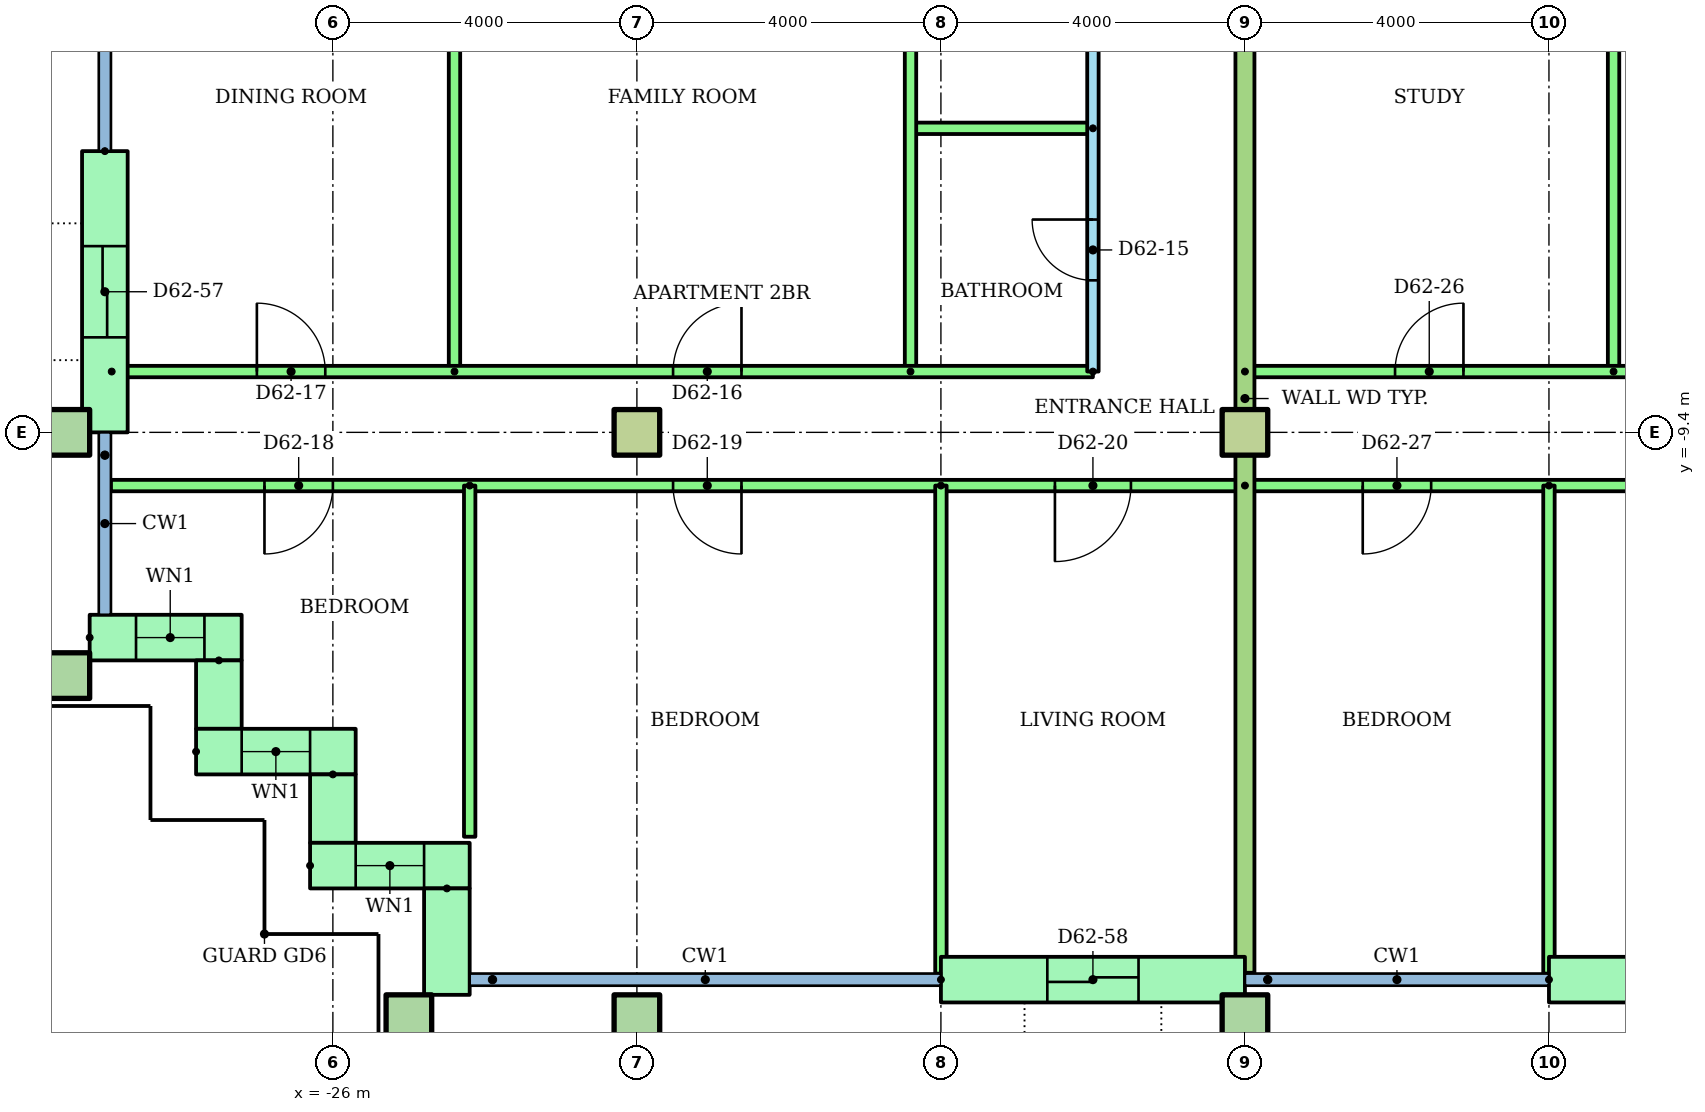
"""IFC4 building model, lengths in metres.
Left out: names, types, materials, properties, quantities, classifications, styles, units other than length and angle.
Written with IfcOpenShell. Run it as: python <this file> out.ifc"""

import sys

from ifc_helpers import new_model, si_unit, direction, frame, frame_2d, origin, origin_2d, place, context, subcontext, project, spatial, rectangle, hollow_rectangle, extrude, element, fill, save


model = new_model("IFC4")
c1 = context("Model", 3, precision=1e-05, world=origin(), true_north=direction((0.0, 1.0)))
c2 = subcontext(c1, "Body", "Model", "MODEL_VIEW")
j1 = project(units=[si_unit("LENGTHUNIT", "METRE"), si_unit("PLANEANGLEUNIT", "RADIAN")], contexts=[c1])
p1 = place(None, origin())
s1 = spatial("IfcSite", under=j1, at=p1, CompositionType="ELEMENT")
p2 = place(p1, origin())
s2 = spatial("IfcBuilding", under=s1, at=p2, CompositionType="ELEMENT")
p3 = place(p2, frame((0.0, 0.0, 236.4)))
s3 = spatial("IfcBuildingStorey", under=s2, at=p3, CompositionType="ELEMENT", Elevation=236.4)
for number, where in (
    (1, (-25.0, -17.1, 0.0)),
    (2, (-22.0, -17.1, 0.0)),
    (3, (-14.0, -17.1, 0.0)),
    (4, (-29.5, -12.6, 0.0)),
    (5, (-29.5, -9.4, 0.0)),
):
    element("IfcColumn", number, at=place(p3, frame(where)), inside=s3, PredefinedType="COLUMN", context=c2, shape_type="SweptSolid", body=[
        extrude(hollow_rectangle(XDim=0.6, YDim=0.6, WallThickness=0.03, at=origin_2d()), origin(), (0.0, 0.0, 1.0), 3.2),
    ])
for number, where in (
    (6, (-22.0, -9.4, 0.0)),
    (7, (-14.0, -9.4, 0.0)),
):
    element("IfcColumn", number, at=place(p3, frame(where)), inside=s3, PredefinedType="COLUMN", context=c2, shape_type="SweptSolid", body=[
        extrude(rectangle(XDim=0.6, YDim=0.6, at=origin_2d()), origin(), (0.0, 0.0, 1.0), 3.2),
    ])
p4 = place(p3, frame((-29.0, -5.7, 0.0), z_axis=(0.0, 0.0, 1.0), x_axis=(0.0, -1.0, 0.0)))
e8 = element("IfcWall", 8, at=p4, inside=s3, PredefinedType="STANDARD", context=c2, shape_type="SweptSolid", body=[
    extrude(rectangle(XDim=3.7, YDim=0.6, at=frame_2d((1.85, 0.0))), origin(), (0.0, 0.0, 1.0), 2.8),
])
p5 = place(p4, frame((1.25, 0.0, 0.0)))
e9 = element("IfcOpeningElement", 9, at=p5, cuts=e8, PredefinedType="OPENING", context=c2, shape_type="SweptSolid", body=[
    extrude(rectangle(XDim=1.2, YDim=2.1, at=frame_2d((0.6, 1.05))), frame((0.0, 0.31, 0.0), z_axis=(0.0, -1.0, 0.0), x_axis=(1.0, 0.0, 0.0)), (0.0, 0.0, 1.0), 0.62),
])
p6 = place(p3, frame((-29.2, -12.1, 0.0)))
e10 = element("IfcWall", 10, at=p6, inside=s3, PredefinedType="STANDARD", context=c2, shape_type="SweptSolid", body=[
    extrude(rectangle(XDim=2.0, YDim=0.6, at=frame_2d((1.0, 0.0))), origin(), (0.0, 0.0, 1.0), 2.8),
])
p7 = place(p6, frame((0.61, 0.0, 0.9)))
e11 = element("IfcOpeningElement", 11, at=p7, cuts=e10, PredefinedType="OPENING", context=c2, shape_type="SweptSolid", body=[
    extrude(rectangle(XDim=0.9, YDim=1.5, at=frame_2d((0.45, 0.75))), frame((0.0, 0.31, 0.0), z_axis=(0.0, -1.0, 0.0), x_axis=(1.0, 0.0, 0.0)), (0.0, 0.0, 1.0), 0.62),
])
p8 = place(p3, frame((-27.5, -12.4, 0.0), z_axis=(0.0, 0.0, 1.0), x_axis=(0.0, -1.0, 0.0)))
e12 = element("IfcWall", 12, at=p8, inside=s3, PredefinedType="STANDARD", context=c2, shape_type="SweptSolid", body=[
    extrude(rectangle(XDim=0.9, YDim=0.6, at=frame_2d((0.45, 0.0))), origin(), (0.0, 0.0, 1.0), 2.8),
])
p9 = place(p3, frame((-27.8, -13.6, 0.0)))
e13 = element("IfcWall", 13, at=p9, inside=s3, PredefinedType="STANDARD", context=c2, shape_type="SweptSolid", body=[
    extrude(rectangle(XDim=2.1, YDim=0.6, at=frame_2d((1.05, 0.0))), origin(), (0.0, 0.0, 1.0), 2.8),
])
p10 = place(p9, frame((0.6, 0.0, 0.9)))
e14 = element("IfcOpeningElement", 14, at=p10, cuts=e13, PredefinedType="OPENING", context=c2, shape_type="SweptSolid", body=[
    extrude(rectangle(XDim=0.9, YDim=1.5, at=frame_2d((0.45, 0.75))), frame((0.0, 0.31, 0.0), z_axis=(0.0, -1.0, 0.0), x_axis=(1.0, 0.0, 0.0)), (0.0, 0.0, 1.0), 0.62),
])
p11 = place(p3, frame((-26.0, -13.9, 0.0), z_axis=(0.0, 0.0, 1.0), x_axis=(0.0, -1.0, 0.0)))
e15 = element("IfcWall", 15, at=p11, inside=s3, PredefinedType="STANDARD", context=c2, shape_type="SweptSolid", body=[
    extrude(rectangle(XDim=0.9, YDim=0.6, at=frame_2d((0.45, 0.0))), origin(), (0.0, 0.0, 1.0), 2.8),
])
p12 = place(p3, frame((-26.3, -15.1, 0.0)))
e16 = element("IfcWall", 16, at=p12, inside=s3, PredefinedType="STANDARD", context=c2, shape_type="SweptSolid", body=[
    extrude(rectangle(XDim=2.1, YDim=0.6, at=frame_2d((1.05, 0.0))), origin(), (0.0, 0.0, 1.0), 2.8),
])
p13 = place(p12, frame((0.6, 0.0, 0.9)))
e17 = element("IfcOpeningElement", 17, at=p13, cuts=e16, PredefinedType="OPENING", context=c2, shape_type="SweptSolid", body=[
    extrude(rectangle(XDim=0.9, YDim=1.5, at=frame_2d((0.45, 0.75))), frame((0.0, 0.31, 0.0), z_axis=(0.0, -1.0, 0.0), x_axis=(1.0, 0.0, 0.0)), (0.0, 0.0, 1.0), 0.62),
])
p14 = place(p3, frame((-24.5, -15.4, 0.0), z_axis=(0.0, 0.0, 1.0), x_axis=(0.0, -1.0, 0.0)))
e18 = element("IfcWall", 18, at=p14, inside=s3, PredefinedType="STANDARD", context=c2, shape_type="SweptSolid", body=[
    extrude(rectangle(XDim=1.4, YDim=0.6, at=frame_2d((0.7, 0.0))), origin(), (0.0, 0.0, 1.0), 2.8),
])
p15 = place(p3, frame((-18.0, -16.6, 0.0)))
e19 = element("IfcWall", 19, at=p15, inside=s3, PredefinedType="STANDARD", context=c2, shape_type="SweptSolid", body=[
    extrude(rectangle(XDim=4.0, YDim=0.6, at=frame_2d((2.0, 0.0))), origin(), (0.0, 0.0, 1.0), 2.8),
])
p16 = place(p15, frame((1.4, 0.0, 0.0)))
e20 = element("IfcOpeningElement", 20, at=p16, cuts=e19, PredefinedType="OPENING", context=c2, shape_type="SweptSolid", body=[
    extrude(rectangle(XDim=1.2, YDim=2.1, at=frame_2d((0.6, 1.05))), frame((0.0, 0.31, 0.0), z_axis=(0.0, -1.0, 0.0), x_axis=(1.0, 0.0, 0.0)), (0.0, 0.0, 1.0), 0.62),
])
p17 = place(p3, frame((-10.0, -16.6, 0.0)))
e21 = element("IfcWall", 21, at=p17, inside=s3, PredefinedType="STANDARD", context=c2, shape_type="SweptSolid", body=[
    extrude(rectangle(XDim=4.0, YDim=0.6, at=frame_2d((2.0, 0.0))), origin(), (0.0, 0.0, 1.0), 2.8),
])
p18 = place(p17, frame((1.4, 0.0, 0.0)))
e22 = element("IfcOpeningElement", 22, at=p18, cuts=e21, PredefinedType="OPENING", context=c2, shape_type="SweptSolid", body=[
    extrude(rectangle(XDim=1.2, YDim=2.1, at=frame_2d((0.6, 1.05))), frame((0.0, 0.31, 0.0), z_axis=(0.0, -1.0, 0.0), x_axis=(1.0, 0.0, 0.0)), (0.0, 0.0, 1.0), 0.62),
])
p19 = place(p3, frame((-16.0, -8.6, 0.0), z_axis=(0.0, 0.0, 1.0), x_axis=(0.0, 1.0, 0.0)))
e23 = element("IfcWall", 23, at=p19, inside=s3, PredefinedType="PARTITIONING", context=c2, shape_type="SweptSolid", body=[
    extrude(rectangle(XDim=7.2, YDim=0.15, at=frame_2d((3.6, 0.0))), origin(), (0.0, 0.0, 1.0), 2.4),
])
p20 = place(p19, frame((4.75, 0.0, 0.0)))
e24 = element("IfcOpeningElement", 24, at=p20, cuts=e23, PredefinedType="OPENING", context=c2, shape_type="SweptSolid", body=[
    extrude(rectangle(XDim=0.9, YDim=2.1, at=frame_2d((0.45, 1.05))), frame((0.0, 0.085, 0.0), z_axis=(0.0, -1.0, 0.0), x_axis=(1.0, 0.0, 0.0)), (0.0, 0.0, 1.0), 0.17),
])
p21 = place(p19, frame((1.2, 0.0, 0.0)))
e25 = element("IfcOpeningElement", 25, at=p21, cuts=e23, PredefinedType="OPENING", context=c2, shape_type="SweptSolid", body=[
    extrude(rectangle(XDim=0.8, YDim=2.1, at=frame_2d((0.4, 1.05))), frame((0.0, 0.085, 0.0), z_axis=(0.0, -1.0, 0.0), x_axis=(1.0, 0.0, 0.0)), (0.0, 0.0, 1.0), 0.17),
])
p22 = place(p3, frame((-16.0, -5.4, 0.0), z_axis=(0.0, 0.0, 1.0), x_axis=(-1.0, 0.0, 0.0)))
e26 = element("IfcWall", 26, at=p22, inside=s3, PredefinedType="PARTITIONING", context=c2, shape_type="SweptSolid", body=[
    extrude(rectangle(XDim=2.4, YDim=0.15, at=frame_2d((1.2, 0.0))), origin(), (0.0, 0.0, 1.0), 2.4),
])
for number, where, z_axis, x_axis in (
    (27, (-18.4, -8.6, 0.0), (0.0, 0.0, 1.0), (0.0, 1.0, 0.0)),
    (28, (-24.4, -8.6, 0.0), (0.0, 0.0, 1.0), (0.0, 1.0, 0.0)),
):
    element("IfcWall", number, at=place(p3, frame(where, z_axis=z_axis, x_axis=x_axis)), inside=s3, PredefinedType="PARTITIONING", context=c2, shape_type="SweptSolid", body=[
        extrude(rectangle(XDim=7.2, YDim=0.15, at=frame_2d((3.6, 0.0))), origin(), (0.0, 0.0, 1.0), 2.4),
    ])
p23 = place(p3, frame((-28.91, -8.6, 0.0)))
e29 = element("IfcWall", 29, at=p23, inside=s3, PredefinedType="PARTITIONING", context=c2, shape_type="SweptSolid", body=[
    extrude(rectangle(XDim=12.91, YDim=0.15, at=frame_2d((6.455, 0.0))), origin(), (0.0, 0.0, 1.0), 2.4),
])
p24 = place(p23, frame((7.386, 0.0, 0.0)))
e30 = element("IfcOpeningElement", 30, at=p24, cuts=e29, PredefinedType="OPENING", context=c2, shape_type="SweptSolid", body=[
    extrude(rectangle(XDim=0.9, YDim=2.1, at=frame_2d((0.45, 1.05))), frame((0.0, 0.085, 0.0), z_axis=(0.0, -1.0, 0.0), x_axis=(1.0, 0.0, 0.0)), (0.0, 0.0, 1.0), 0.17),
])
p25 = place(p23, frame((1.91, 0.0, 0.0)))
e31 = element("IfcOpeningElement", 31, at=p25, cuts=e29, PredefinedType="OPENING", context=c2, shape_type="SweptSolid", body=[
    extrude(rectangle(XDim=0.9, YDim=2.1, at=frame_2d((0.45, 1.05))), frame((0.0, 0.085, 0.0), z_axis=(0.0, -1.0, 0.0), x_axis=(1.0, 0.0, 0.0)), (0.0, 0.0, 1.0), 0.17),
])
p26 = place(p3, frame((-14.0, -10.1, 0.0), z_axis=(0.0, 0.0, 1.0), x_axis=(-1.0, 0.0, 0.0)))
e32 = element("IfcWall", 32, at=p26, inside=s3, PredefinedType="PARTITIONING", context=c2, shape_type="SweptSolid", body=[
    extrude(rectangle(XDim=14.92, YDim=0.15, at=frame_2d((7.46, 0.0))), origin(), (0.0, 0.0, 1.0), 2.4),
])
p27 = place(p26, frame((12.0, 0.0, 0.0)))
e33 = element("IfcOpeningElement", 33, at=p27, cuts=e32, PredefinedType="OPENING", context=c2, shape_type="SweptSolid", body=[
    extrude(rectangle(XDim=0.9, YDim=2.1, at=frame_2d((0.45, 1.05))), frame((0.0, 0.085, 0.0), z_axis=(0.0, -1.0, 0.0), x_axis=(1.0, 0.0, 0.0)), (0.0, 0.0, 1.0), 0.17),
])
p28 = place(p26, frame((6.624, 0.0, 0.0)))
e34 = element("IfcOpeningElement", 34, at=p28, cuts=e32, PredefinedType="OPENING", context=c2, shape_type="SweptSolid", body=[
    extrude(rectangle(XDim=0.9, YDim=2.1, at=frame_2d((0.45, 1.05))), frame((0.0, 0.085, 0.0), z_axis=(0.0, -1.0, 0.0), x_axis=(1.0, 0.0, 0.0)), (0.0, 0.0, 1.0), 0.17),
])
p29 = place(p26, frame((1.5, 0.0, 0.0)))
e35 = element("IfcOpeningElement", 35, at=p29, cuts=e32, PredefinedType="OPENING", context=c2, shape_type="SweptSolid", body=[
    extrude(rectangle(XDim=1.0, YDim=2.1, at=frame_2d((0.5, 1.05))), frame((0.0, 0.085, 0.0), z_axis=(0.0, -1.0, 0.0), x_axis=(1.0, 0.0, 0.0)), (0.0, 0.0, 1.0), 0.17),
])
p30 = place(p3, frame((-24.2, -10.1, 0.0), z_axis=(0.0, 0.0, 1.0), x_axis=(0.0, -1.0, 0.0)))
e36 = element("IfcWall", 36, at=p30, inside=s3, PredefinedType="PARTITIONING", context=c2, shape_type="SweptSolid", body=[
    extrude(rectangle(XDim=4.62, YDim=0.15, at=frame_2d((2.31, 0.0))), origin(), (0.0, 0.0, 1.0), 2.4),
])
p31 = place(p3, frame((-18.0, -10.1, 0.0), z_axis=(0.0, 0.0, 1.0), x_axis=(0.0, -1.0, 0.0)))
e37 = element("IfcWall", 37, at=p31, inside=s3, PredefinedType="PARTITIONING", context=c2, shape_type="SweptSolid", body=[
    extrude(rectangle(XDim=6.421, YDim=0.15, at=frame_2d((3.21, 0.0))), origin(), (0.0, 0.0, 1.0), 2.4),
])
p32 = place(p3, frame((-9.15, -8.6, 0.0), z_axis=(0.0, 0.0, 1.0), x_axis=(0.0, 1.0, 0.0)))
e38 = element("IfcWall", 38, at=p32, inside=s3, PredefinedType="PARTITIONING", context=c2, shape_type="SweptSolid", body=[
    extrude(rectangle(XDim=7.2, YDim=0.15, at=frame_2d((3.6, 0.0))), origin(), (0.0, 0.0, 1.0), 2.4),
])
p33 = place(p3, frame((-14.0, -8.6, 0.0)))
e39 = element("IfcWall", 39, at=p33, inside=s3, PredefinedType="PARTITIONING", context=c2, shape_type="SweptSolid", body=[
    extrude(rectangle(XDim=14.0, YDim=0.15, at=frame_2d((7.0, 0.0))), origin(), (0.0, 0.0, 1.0), 2.4),
])
p34 = place(p33, frame((9.65, 0.0, 0.0)))
e40 = element("IfcOpeningElement", 40, at=p34, cuts=e39, PredefinedType="OPENING", context=c2, shape_type="SweptSolid", body=[
    extrude(rectangle(XDim=0.9, YDim=2.1, at=frame_2d((0.45, 1.05))), frame((0.0, 0.085, 0.0), z_axis=(0.0, -1.0, 0.0), x_axis=(1.0, 0.0, 0.0)), (0.0, 0.0, 1.0), 0.17),
])
p35 = place(p33, frame((6.275, 0.0, 0.0)))
e41 = element("IfcOpeningElement", 41, at=p35, cuts=e39, PredefinedType="OPENING", context=c2, shape_type="SweptSolid", body=[
    extrude(rectangle(XDim=0.9, YDim=2.1, at=frame_2d((0.45, 1.05))), frame((0.0, 0.085, 0.0), z_axis=(0.0, -1.0, 0.0), x_axis=(1.0, 0.0, 0.0)), (0.0, 0.0, 1.0), 0.17),
])
p36 = place(p33, frame((1.975, 0.0, 0.0)))
e42 = element("IfcOpeningElement", 42, at=p36, cuts=e39, PredefinedType="OPENING", context=c2, shape_type="SweptSolid", body=[
    extrude(rectangle(XDim=0.9, YDim=2.1, at=frame_2d((0.45, 1.05))), frame((0.0, 0.085, 0.0), z_axis=(0.0, -1.0, 0.0), x_axis=(1.0, 0.0, 0.0)), (0.0, 0.0, 1.0), 0.17),
])
p37 = place(p3, frame((2.0, -10.1, 0.0), z_axis=(0.0, 0.0, 1.0), x_axis=(-1.0, 0.0, 0.0)))
e43 = element("IfcWall", 43, at=p37, inside=s3, PredefinedType="PARTITIONING", context=c2, shape_type="SweptSolid", body=[
    extrude(rectangle(XDim=16.0, YDim=0.15, at=frame_2d((8.0, 0.0))), origin(), (0.0, 0.0, 1.0), 2.4),
])
p38 = place(p37, frame((13.55, 0.0, 0.0)))
e44 = element("IfcOpeningElement", 44, at=p38, cuts=e43, PredefinedType="OPENING", context=c2, shape_type="SweptSolid", body=[
    extrude(rectangle(XDim=0.9, YDim=2.1, at=frame_2d((0.45, 1.05))), frame((0.0, 0.085, 0.0), z_axis=(0.0, -1.0, 0.0), x_axis=(1.0, 0.0, 0.0)), (0.0, 0.0, 1.0), 0.17),
])
p39 = place(p37, frame((9.55, 0.0, 0.0)))
e45 = element("IfcOpeningElement", 45, at=p39, cuts=e43, PredefinedType="OPENING", context=c2, shape_type="SweptSolid", body=[
    extrude(rectangle(XDim=0.9, YDim=2.1, at=frame_2d((0.45, 1.05))), frame((0.0, 0.085, 0.0), z_axis=(0.0, -1.0, 0.0), x_axis=(1.0, 0.0, 0.0)), (0.0, 0.0, 1.0), 0.17),
])
p40 = place(p37, frame((3.5, 0.0, 0.0)))
e46 = element("IfcOpeningElement", 46, at=p40, cuts=e43, PredefinedType="OPENING", context=c2, shape_type="SweptSolid", body=[
    extrude(rectangle(XDim=1.0, YDim=2.1, at=frame_2d((0.5, 1.05))), frame((0.0, 0.085, 0.0), z_axis=(0.0, -1.0, 0.0), x_axis=(1.0, 0.0, 0.0)), (0.0, 0.0, 1.0), 0.17),
])
p41 = place(p3, frame((-10.0, -10.1, 0.0), z_axis=(0.0, 0.0, 1.0), x_axis=(0.0, -1.0, 0.0)))
e47 = element("IfcWall", 47, at=p41, inside=s3, PredefinedType="PARTITIONING", context=c2, shape_type="SweptSolid", body=[
    extrude(rectangle(XDim=6.421, YDim=0.15, at=frame_2d((3.21, 0.0))), origin(), (0.0, 0.0, 1.0), 2.4),
])
p42 = place(p3, frame((-14.0, -1.4, 0.0), z_axis=(0.0, 0.0, 1.0), x_axis=(0.0, -1.0, 0.0)))
e48 = element("IfcWall", 48, at=p42, inside=s3, PredefinedType="PARTITIONING", context=c2, shape_type="SweptSolid", body=[
    extrude(rectangle(XDim=15.11, YDim=0.25, at=frame_2d((7.555, 0.0))), origin(), (0.0, 0.0, 1.0), 2.4),
])
p43 = place(p7, origin())
e49 = element("IfcWindow", 49, at=p43, inside=s3, PartitioningType="SINGLE_PANEL", PredefinedType="WINDOW", context=c2, shape_type="SweptSolid", body=[
    extrude(rectangle(XDim=0.9, YDim=1.5, at=frame_2d((0.45, 0.75))), frame((0.0, 0.03, 0.0), z_axis=(0.0, -1.0, 0.0), x_axis=(1.0, 0.0, 0.0)), (0.0, 0.0, 1.0), 0.06),
])
fill(e11, e49)
p44 = place(p10, origin())
e50 = element("IfcWindow", 50, at=p44, inside=s3, PartitioningType="SINGLE_PANEL", PredefinedType="WINDOW", context=c2, shape_type="SweptSolid", body=[
    extrude(rectangle(XDim=0.9, YDim=1.5, at=frame_2d((0.45, 0.75))), frame((0.0, 0.03, 0.0), z_axis=(0.0, -1.0, 0.0), x_axis=(1.0, 0.0, 0.0)), (0.0, 0.0, 1.0), 0.06),
])
fill(e14, e50)
p45 = place(p13, origin())
e51 = element("IfcWindow", 51, at=p45, inside=s3, PartitioningType="SINGLE_PANEL", PredefinedType="WINDOW", context=c2, shape_type="SweptSolid", body=[
    extrude(rectangle(XDim=0.9, YDim=1.5, at=frame_2d((0.45, 0.75))), frame((0.0, 0.03, 0.0), z_axis=(0.0, -1.0, 0.0), x_axis=(1.0, 0.0, 0.0)), (0.0, 0.0, 1.0), 0.06),
])
fill(e17, e51)
p46 = place(p21, origin())
e52 = element("IfcDoor", 52, at=p46, inside=s3, OperationType="SINGLE_SWING_RIGHT", PredefinedType="DOOR", context=c2, shape_type="SweptSolid", body=[
    extrude(rectangle(XDim=0.8, YDim=2.1, at=frame_2d((0.4, 1.05))), frame((0.0, 0.025, 0.0), z_axis=(0.0, -1.0, 0.0), x_axis=(1.0, 0.0, 0.0)), (0.0, 0.0, 1.0), 0.05),
])
fill(e25, e52)
p47 = place(p24, origin())
e53 = element("IfcDoor", 53, at=p47, inside=s3, OperationType="SINGLE_SWING_RIGHT", PredefinedType="DOOR", context=c2, shape_type="SweptSolid", body=[
    extrude(rectangle(XDim=0.9, YDim=2.1, at=frame_2d((0.45, 1.05))), frame((0.0, 0.025, 0.0), z_axis=(0.0, -1.0, 0.0), x_axis=(1.0, 0.0, 0.0)), (0.0, 0.0, 1.0), 0.05),
])
fill(e30, e53)
p48 = place(p25, origin())
e54 = element("IfcDoor", 54, at=p48, inside=s3, OperationType="SINGLE_SWING_LEFT", PredefinedType="DOOR", context=c2, shape_type="SweptSolid", body=[
    extrude(rectangle(XDim=0.9, YDim=2.1, at=frame_2d((0.45, 1.05))), frame((0.0, 0.025, 0.0), z_axis=(0.0, -1.0, 0.0), x_axis=(1.0, 0.0, 0.0)), (0.0, 0.0, 1.0), 0.05),
])
fill(e31, e54)
p49 = place(p27, origin())
e55 = element("IfcDoor", 55, at=p49, inside=s3, OperationType="SINGLE_SWING_RIGHT", PredefinedType="DOOR", context=c2, shape_type="SweptSolid", body=[
    extrude(rectangle(XDim=0.9, YDim=2.1, at=frame_2d((0.45, 1.05))), frame((0.0, 0.025, 0.0), z_axis=(0.0, -1.0, 0.0), x_axis=(1.0, 0.0, 0.0)), (0.0, 0.0, 1.0), 0.05),
])
fill(e33, e55)
p50 = place(p28, origin())
e56 = element("IfcDoor", 56, at=p50, inside=s3, OperationType="SINGLE_SWING_LEFT", PredefinedType="DOOR", context=c2, shape_type="SweptSolid", body=[
    extrude(rectangle(XDim=0.9, YDim=2.1, at=frame_2d((0.45, 1.05))), frame((0.0, 0.025, 0.0), z_axis=(0.0, -1.0, 0.0), x_axis=(1.0, 0.0, 0.0)), (0.0, 0.0, 1.0), 0.05),
])
fill(e34, e56)
p51 = place(p29, origin())
e57 = element("IfcDoor", 57, at=p51, inside=s3, OperationType="SINGLE_SWING_RIGHT", PredefinedType="DOOR", context=c2, shape_type="SweptSolid", body=[
    extrude(rectangle(XDim=1.0, YDim=2.1, at=frame_2d((0.5, 1.05))), frame((0.0, 0.025, 0.0), z_axis=(0.0, -1.0, 0.0), x_axis=(1.0, 0.0, 0.0)), (0.0, 0.0, 1.0), 0.05),
])
fill(e35, e57)
p52 = place(p36, origin())
e58 = element("IfcDoor", 58, at=p52, inside=s3, OperationType="SINGLE_SWING_RIGHT", PredefinedType="DOOR", context=c2, shape_type="SweptSolid", body=[
    extrude(rectangle(XDim=0.9, YDim=2.1, at=frame_2d((0.45, 1.05))), frame((0.0, 0.025, 0.0), z_axis=(0.0, -1.0, 0.0), x_axis=(1.0, 0.0, 0.0)), (0.0, 0.0, 1.0), 0.05),
])
fill(e42, e58)
p53 = place(p38, origin())
e59 = element("IfcDoor", 59, at=p53, inside=s3, OperationType="SINGLE_SWING_RIGHT", PredefinedType="DOOR", context=c2, shape_type="SweptSolid", body=[
    extrude(rectangle(XDim=0.9, YDim=2.1, at=frame_2d((0.45, 1.05))), frame((0.0, 0.025, 0.0), z_axis=(0.0, -1.0, 0.0), x_axis=(1.0, 0.0, 0.0)), (0.0, 0.0, 1.0), 0.05),
])
fill(e44, e59)
p54 = place(p5, origin())
e60 = element("IfcDoor", 60, at=p54, inside=s3, OperationType="SLIDING_TO_LEFT", PredefinedType="DOOR", context=c2, shape_type="SweptSolid", body=[
    extrude(rectangle(XDim=1.2, YDim=2.1, at=frame_2d((0.6, 1.05))), frame((0.0, 0.025, 0.0), z_axis=(0.0, -1.0, 0.0), x_axis=(1.0, 0.0, 0.0)), (0.0, 0.0, 1.0), 0.05),
])
fill(e9, e60)
p55 = place(p16, origin())
e61 = element("IfcDoor", 61, at=p55, inside=s3, OperationType="SLIDING_TO_LEFT", PredefinedType="DOOR", context=c2, shape_type="SweptSolid", body=[
    extrude(rectangle(XDim=1.2, YDim=2.1, at=frame_2d((0.6, 1.05))), frame((0.0, 0.025, 0.0), z_axis=(0.0, -1.0, 0.0), x_axis=(1.0, 0.0, 0.0)), (0.0, 0.0, 1.0), 0.05),
])
fill(e20, e61)
save(model, sys.argv[1])
